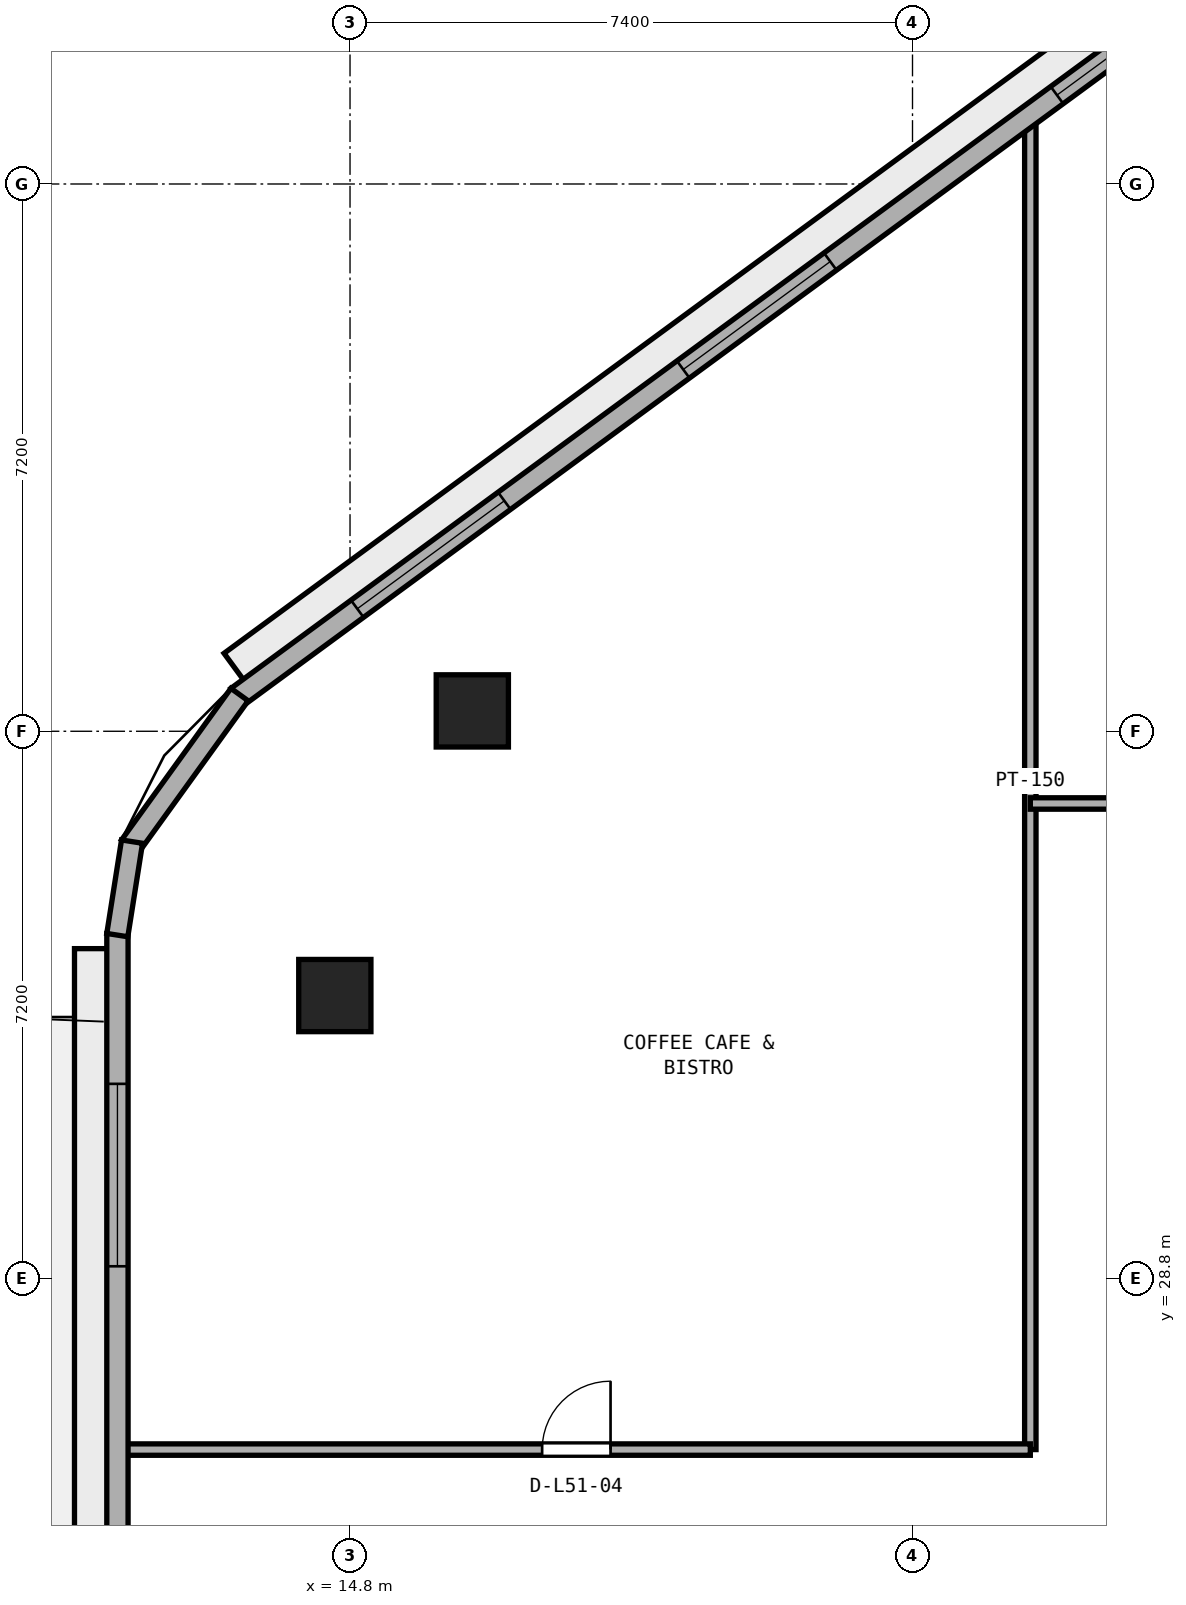
"""IFC4 building model, lengths in metres.
Left out: names, types, materials, properties, quantities, classifications, styles, units other than length and angle.
Written with IfcOpenShell. Run it as: python <this file> out.ifc"""

import sys

from ifc_helpers import new_model, si_unit, direction, frame, frame_2d, origin, origin_2d, place, context, subcontext, project, spatial, rectangle, extrude, element, fill, save


model = new_model("IFC4")
c1 = context("Model", 3, precision=1e-05, world=origin(), true_north=direction((0.0, 1.0)))
c2 = subcontext(c1, "Body", "Model", "MODEL_VIEW")
j1 = project(units=[si_unit("LENGTHUNIT", "METRE"), si_unit("PLANEANGLEUNIT", "RADIAN")], contexts=[c1])
p1 = place(None, origin())
s1 = spatial("IfcSite", under=j1, at=p1, CompositionType="ELEMENT")
p2 = place(p1, origin())
s2 = spatial("IfcBuilding", under=s1, at=p2, CompositionType="ELEMENT")
p3 = place(p2, frame((0.0, 0.0, 201.0)))
s3 = spatial("IfcBuildingStorey", under=s2, at=p3, CompositionType="ELEMENT", Elevation=201.0)
for number, where, z_axis, x_axis in (
    (1, (16.409, 36.268, 0.0), (0.0, 0.0, 1.0), (1.0, 0.0, 0.0)),
    (2, (14.6, 32.523, 0.0), (0.0, 0.0, 1.0), (1.0, 0.0, 0.0)),
):
    element("IfcColumn", number, at=place(p3, frame(where, z_axis=z_axis, x_axis=x_axis)), inside=s3, PredefinedType="COLUMN", context=c2, shape_type="SweptSolid", body=[
        extrude(rectangle(XDim=0.95, YDim=0.95, at=origin_2d()), origin(), (0.0, 0.0, 1.0), 3.8),
    ])
p4 = place(p3, frame((23.75, 26.55, 0.0), z_axis=(0.0, 0.0, 1.0), x_axis=(0.0, 1.0, 0.0)))
e3 = element("IfcWall", 3, at=p4, inside=s3, PredefinedType="PARTITIONING", context=c2, shape_type="SweptSolid", body=[
    extrude(rectangle(XDim=17.596, YDim=0.15, at=frame_2d((8.798, 0.0))), origin(), (0.0, 0.0, 1.0), 3.54),
])
p5 = place(p3, frame((11.805, 26.55, 0.0), z_axis=(0.0, 0.0, 1.0), x_axis=(1.0, 0.0, 0.0)))
e4 = element("IfcWall", 4, at=p5, inside=s3, PredefinedType="PARTITIONING", context=c2, shape_type="SweptSolid", body=[
    extrude(rectangle(XDim=11.945, YDim=0.15, at=frame_2d((5.973, 0.0))), origin(), (0.0, 0.0, 1.0), 3.54),
])
p6 = place(p5, frame((5.522, 0.0, 0.0)))
e5 = element("IfcOpeningElement", 5, at=p6, cuts=e4, PredefinedType="OPENING", context=c2, shape_type="SweptSolid", body=[
    extrude(rectangle(XDim=0.9, YDim=2.1, at=frame_2d((0.45, 1.05))), frame((0.0, 0.085, 0.0), z_axis=(0.0, -1.0, 0.0), x_axis=(1.0, 0.0, 0.0)), (0.0, 0.0, 1.0), 0.17),
])
p7 = place(p3, frame((23.75, 35.05, 0.0), z_axis=(0.0, 0.0, 1.0), x_axis=(1.0, 0.0, 0.0)))
e6 = element("IfcWall", 6, at=p7, inside=s3, PredefinedType="PARTITIONING", context=c2, shape_type="SweptSolid", body=[
    extrude(rectangle(XDim=26.5, YDim=0.15, at=frame_2d((13.25, 0.0))), origin(), (0.0, 0.0, 1.0), 3.54),
])
p8 = place(p7, frame((12.75, 0.0, 0.0)))
e7 = element("IfcOpeningElement", 7, at=p8, cuts=e6, PredefinedType="OPENING", context=c2, shape_type="SweptSolid", body=[
    extrude(rectangle(XDim=1.0, YDim=2.12, at=frame_2d((0.5, 1.06))), frame((0.0, 0.085, 0.0), z_axis=(0.0, -1.0, 0.0), x_axis=(1.0, 0.0, 0.0)), (0.0, 0.0, 1.0), 0.17),
])
p9 = place(p3, frame((26.986, 46.488, 0.0), z_axis=(0.0, 0.0, 1.0), x_axis=(-0.806097783211, -0.59178236194, 0.0)))
e8 = element("IfcWall", 8, at=p9, inside=s3, PredefinedType="STANDARD", context=c2, shape_type="SweptSolid", body=[
    extrude(rectangle(XDim=16.959, YDim=0.28, at=frame_2d((8.479, 0.0))), origin(), (0.0, 0.0, 1.0), 3.54),
])
p10 = place(p9, frame((1.18, 0.0, 0.9)))
e9 = element("IfcOpeningElement", 9, at=p10, cuts=e8, PredefinedType="OPENING", context=c2, shape_type="SweptSolid", body=[
    extrude(rectangle(XDim=2.4, YDim=1.75, at=frame_2d((1.2, 0.875))), frame((0.0, 0.15, 0.0), z_axis=(0.0, -1.0, 0.0), x_axis=(1.0, 0.0, 0.0)), (0.0, 0.0, 1.0), 0.3),
])
p11 = place(p9, frame((7.279, 0.0, 0.9)))
e10 = element("IfcOpeningElement", 10, at=p11, cuts=e8, PredefinedType="OPENING", context=c2, shape_type="SweptSolid", body=[
    extrude(rectangle(XDim=2.4, YDim=1.75, at=frame_2d((1.2, 0.875))), frame((0.0, 0.15, 0.0), z_axis=(0.0, -1.0, 0.0), x_axis=(1.0, 0.0, 0.0)), (0.0, 0.0, 1.0), 0.3),
])
p12 = place(p9, frame((12.599, 0.0, 0.9)))
e11 = element("IfcOpeningElement", 11, at=p12, cuts=e8, PredefinedType="OPENING", context=c2, shape_type="SweptSolid", body=[
    extrude(rectangle(XDim=2.4, YDim=1.75, at=frame_2d((1.2, 0.875))), frame((0.0, 0.15, 0.0), z_axis=(0.0, -1.0, 0.0), x_axis=(1.0, 0.0, 0.0)), (0.0, 0.0, 1.0), 0.3),
])
p13 = place(p3, frame((11.74, 33.34, 0.0), z_axis=(0.0, 0.0, 1.0), x_axis=(0.0, -1.0, 0.0)))
e12 = element("IfcWall", 12, at=p13, inside=s3, PredefinedType="STANDARD", context=c2, shape_type="SweptSolid", body=[
    extrude(rectangle(XDim=17.073, YDim=0.28, at=frame_2d((8.536, 0.0))), origin(), (0.0, 0.0, 1.0), 3.54),
])
p14 = place(p13, frame((7.986, 0.0, 0.0)))
e13 = element("IfcOpeningElement", 13, at=p14, cuts=e12, PredefinedType="OPENING", context=c2, shape_type="SweptSolid", body=[
    extrude(rectangle(XDim=1.1, YDim=2.2, at=frame_2d((0.55, 1.1))), frame((0.0, 0.15, 0.0), z_axis=(0.0, -1.0, 0.0), x_axis=(1.0, 0.0, 0.0)), (0.0, 0.0, 1.0), 0.3),
])
p15 = place(p13, frame((1.979, 0.0, 0.9)))
e14 = element("IfcOpeningElement", 14, at=p15, cuts=e12, PredefinedType="OPENING", context=c2, shape_type="SweptSolid", body=[
    extrude(rectangle(XDim=2.4, YDim=1.75, at=frame_2d((1.2, 0.875))), frame((0.0, 0.15, 0.0), z_axis=(0.0, -1.0, 0.0), x_axis=(1.0, 0.0, 0.0)), (0.0, 0.0, 1.0), 0.3),
])
p16 = place(p13, frame((12.694, 0.0, 0.9)))
e15 = element("IfcOpeningElement", 15, at=p16, cuts=e12, PredefinedType="OPENING", context=c2, shape_type="SweptSolid", body=[
    extrude(rectangle(XDim=2.4, YDim=1.75, at=frame_2d((1.2, 0.875))), frame((0.0, 0.15, 0.0), z_axis=(0.0, -1.0, 0.0), x_axis=(1.0, 0.0, 0.0)), (0.0, 0.0, 1.0), 0.3),
])
p17 = place(p3, frame((13.346, 36.483, 0.0), z_axis=(0.0, 0.0, 1.0), x_axis=(-0.585128091556, -0.810940883463, 0.0)))
e16 = element("IfcWall", 16, at=p17, inside=s3, PredefinedType="STANDARD", context=c2, shape_type="SweptSolid", body=[
    extrude(rectangle(XDim=2.46, YDim=0.28, at=frame_2d((1.23, 0.0))), origin(), (0.0, 0.0, 1.0), 3.54),
])
p18 = place(p3, frame((11.932, 34.548, 0.0), z_axis=(0.0, 0.0, 1.0), x_axis=(-0.155519443181, -0.987832831401, 0.0)))
e17 = element("IfcWall", 17, at=p18, inside=s3, PredefinedType="STANDARD", context=c2, shape_type="SweptSolid", body=[
    extrude(rectangle(XDim=1.245, YDim=0.28, at=frame_2d((0.623, 0.0))), origin(), (0.0, 0.0, 1.0), 3.54),
])
p19 = place(p6, origin())
e18 = element("IfcDoor", 18, at=p19, inside=s3, OperationType="SINGLE_SWING_RIGHT", PredefinedType="DOOR", context=c2, shape_type="SweptSolid", body=[
    extrude(rectangle(XDim=0.9, YDim=2.1, at=frame_2d((0.45, 1.05))), frame((0.0, 0.025, 0.0), z_axis=(0.0, -1.0, 0.0), x_axis=(1.0, 0.0, 0.0)), (0.0, 0.0, 1.0), 0.05),
])
fill(e5, e18)
p20 = place(p10, origin())
e19 = element("IfcWindow", 19, at=p20, inside=s3, PartitioningType="SINGLE_PANEL", PredefinedType="WINDOW", context=c2, shape_type="SweptSolid", body=[
    extrude(rectangle(XDim=2.4, YDim=1.75, at=frame_2d((1.2, 0.875))), frame((0.0, 0.03, 0.0), z_axis=(0.0, -1.0, 0.0), x_axis=(1.0, 0.0, 0.0)), (0.0, 0.0, 1.0), 0.06),
])
fill(e9, e19)
p21 = place(p11, origin())
e20 = element("IfcWindow", 20, at=p21, inside=s3, PartitioningType="SINGLE_PANEL", PredefinedType="WINDOW", context=c2, shape_type="SweptSolid", body=[
    extrude(rectangle(XDim=2.4, YDim=1.75, at=frame_2d((1.2, 0.875))), frame((0.0, 0.03, 0.0), z_axis=(0.0, -1.0, 0.0), x_axis=(1.0, 0.0, 0.0)), (0.0, 0.0, 1.0), 0.06),
])
fill(e10, e20)
p22 = place(p12, origin())
e21 = element("IfcWindow", 21, at=p22, inside=s3, PartitioningType="SINGLE_PANEL", PredefinedType="WINDOW", context=c2, shape_type="SweptSolid", body=[
    extrude(rectangle(XDim=2.4, YDim=1.75, at=frame_2d((1.2, 0.875))), frame((0.0, 0.03, 0.0), z_axis=(0.0, -1.0, 0.0), x_axis=(1.0, 0.0, 0.0)), (0.0, 0.0, 1.0), 0.06),
])
fill(e11, e21)
p23 = place(p15, origin())
e22 = element("IfcWindow", 22, at=p23, inside=s3, PartitioningType="SINGLE_PANEL", PredefinedType="WINDOW", context=c2, shape_type="SweptSolid", body=[
    extrude(rectangle(XDim=2.4, YDim=1.75, at=frame_2d((1.2, 0.875))), frame((0.0, 0.03, 0.0), z_axis=(0.0, -1.0, 0.0), x_axis=(1.0, 0.0, 0.0)), (0.0, 0.0, 1.0), 0.06),
])
fill(e14, e22)
save(model, sys.argv[1])
